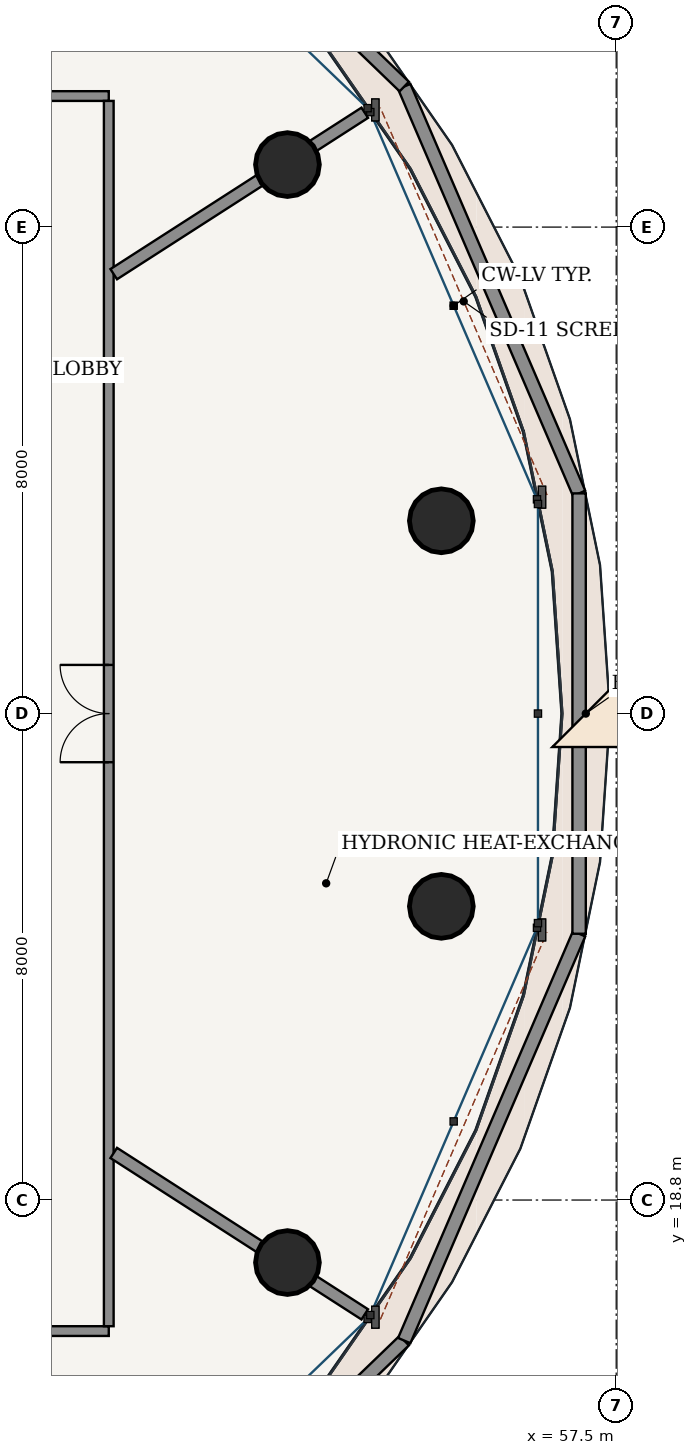
"""IFC4 building model, lengths in metres.
Left out: names, types, materials, properties, quantities, classifications, styles, units other than length and angle.
Written with IfcOpenShell. Run it as: python <this file> out.ifc"""

import sys

from ifc_helpers import new_model, si_unit, direction, frame, frame_2d, origin, origin_2d, place, context, subcontext, project, spatial, rectangle, hollow_circle, extrude, source, transform, mapped, element, fill, save


model = new_model("IFC4")
c1 = context("Model", 3, precision=1e-05, world=origin(), true_north=direction((-0.2419218956, 0.970295726276)))
c2 = subcontext(c1, "Body", "Model", "MODEL_VIEW")
j1 = project(units=[si_unit("LENGTHUNIT", "METRE"), si_unit("PLANEANGLEUNIT", "RADIAN")], contexts=[c1])
p1 = place(None, origin())
s1 = spatial("IfcSite", under=j1, at=p1, CompositionType="ELEMENT")
p2 = place(p1, origin())
s2 = spatial("IfcBuilding", under=s1, at=p2, CompositionType="ELEMENT")
p3 = place(p2, frame((0.0, 0.0, 300.7)))
s3 = spatial("IfcBuildingStorey", under=s2, at=p3, CompositionType="ELEMENT", Elevation=300.7)
for number, where, z_axis, x_axis in (
    (1, (54.624, 29.97, 0.0), (0.0, 0.0, 1.0), (1.0, 0.0, 0.0)),
    (2, (52.094, 35.828, 0.0), (0.0, 0.0, 1.0), (1.0, 0.0, 0.0)),
    (3, (52.094, 17.772, 0.0), (0.0, 0.0, 1.0), (1.0, 0.0, 0.0)),
    (4, (54.624, 23.63, 0.0), (0.0, 0.0, 1.0), (1.0, 0.0, 0.0)),
):
    element("IfcColumn", number, at=place(p3, frame(where, z_axis=z_axis, x_axis=x_axis)), inside=s3, PredefinedType="COLUMN", context=c2, shape_type="SweptSolid", body=[
        extrude(hollow_circle(Radius=0.525, WallThickness=0.035, at=origin_2d()), origin(), (0.0, 0.0, 1.0), 5.4),
    ])
p4 = place(p3, frame((56.89, 30.421, 0.0), z_axis=(0.0, 0.0, 1.0), x_axis=(-0.394894199948, 0.918726602884, 0.0)))
e5 = element("IfcWall", 5, at=p4, inside=s3, PredefinedType="PARAPET", context=c2, shape_type="SweptSolid", body=[
    extrude(rectangle(XDim=7.282, YDim=0.22, at=frame_2d((3.641, 0.0))), origin(), (0.0, 0.0, 1.0), 1.15),
])
p5 = place(p3, frame((54.014, 37.111, 0.0), z_axis=(0.0, 0.0, 1.0), x_axis=(-0.720069776959, 0.693901661845, 0.0)))
e6 = element("IfcWall", 6, at=p5, inside=s3, PredefinedType="PARAPET", context=c2, shape_type="SweptSolid", body=[
    extrude(rectangle(XDim=7.38, YDim=0.22, at=frame_2d((3.69, 0.0))), origin(), (0.0, 0.0, 1.0), 1.15),
])
p6 = place(p3, frame((48.7, 11.368, 0.0), z_axis=(0.0, 0.0, 1.0), x_axis=(0.720086306967, 0.693884508055, 0.0)))
e7 = element("IfcWall", 7, at=p6, inside=s3, PredefinedType="PARAPET", context=c2, shape_type="SweptSolid", body=[
    extrude(rectangle(XDim=7.38, YDim=0.22, at=frame_2d((3.69, 0.0))), origin(), (0.0, 0.0, 1.0), 1.15),
])
p7 = place(p3, frame((54.014, 16.489, 0.0), z_axis=(0.0, 0.0, 1.0), x_axis=(0.394882037325, 0.918731830622, 0.0)))
e8 = element("IfcWall", 8, at=p7, inside=s3, PredefinedType="PARAPET", context=c2, shape_type="SweptSolid", body=[
    extrude(rectangle(XDim=7.282, YDim=0.22, at=frame_2d((3.641, 0.0))), origin(), (0.0, 0.0, 1.0), 1.15),
])
p8 = place(p3, frame((56.89, 23.179, 0.0), z_axis=(0.0, 0.0, 1.0), x_axis=(0.0, 1.0, 0.0)))
e9 = element("IfcWall", 9, at=p8, inside=s3, PredefinedType="PARAPET", context=c2, shape_type="SweptSolid", body=[
    extrude(rectangle(XDim=7.242, YDim=0.22, at=frame_2d((3.621, 0.0))), origin(), (0.0, 0.0, 1.0), 1.15),
])
p9 = place(p3, frame((26.845, 16.645, 0.0), z_axis=(0.0, 0.0, 1.0), x_axis=(1.0, 0.0, 0.0)))
e10 = element("IfcWall", 10, at=p9, inside=s3, PredefinedType="PARTITIONING", context=c2, shape_type="SweptSolid", body=[
    extrude(rectangle(XDim=22.31, YDim=0.16, at=frame_2d((11.155, 0.0))), origin(), (0.0, 0.0, 1.0), 4.552),
])
p10 = place(p9, frame((10.355, 0.0, 0.0)))
e11 = element("IfcOpeningElement", 11, at=p10, cuts=e10, PredefinedType="OPENING", context=c2, shape_type="SweptSolid", body=[
    extrude(rectangle(XDim=1.6, YDim=2.25, at=frame_2d((0.8, 1.125))), frame((0.0, 0.09, 0.0), z_axis=(0.0, -1.0, 0.0), x_axis=(1.0, 0.0, 0.0)), (0.0, 0.0, 1.0), 0.18),
])
p11 = place(p3, frame((26.845, 36.955, 0.0), z_axis=(0.0, 0.0, 1.0), x_axis=(1.0, 0.0, 0.0)))
e12 = element("IfcWall", 12, at=p11, inside=s3, PredefinedType="PARTITIONING", context=c2, shape_type="SweptSolid", body=[
    extrude(rectangle(XDim=22.31, YDim=0.16, at=frame_2d((11.155, 0.0))), origin(), (0.0, 0.0, 1.0), 4.552),
])
p12 = place(p11, frame((10.355, 0.0, 0.0)))
e13 = element("IfcOpeningElement", 13, at=p12, cuts=e12, PredefinedType="OPENING", context=c2, shape_type="SweptSolid", body=[
    extrude(rectangle(XDim=1.6, YDim=2.25, at=frame_2d((0.8, 1.125))), frame((0.0, 0.09, 0.0), z_axis=(0.0, -1.0, 0.0), x_axis=(1.0, 0.0, 0.0)), (0.0, 0.0, 1.0), 0.18),
])
p13 = place(p3, frame((49.155, 16.725, 0.0), z_axis=(0.0, 0.0, 1.0), x_axis=(0.0, 1.0, 0.0)))
e14 = element("IfcWall", 14, at=p13, inside=s3, PredefinedType="PARTITIONING", context=c2, shape_type="SweptSolid", body=[
    extrude(rectangle(XDim=20.15, YDim=0.16, at=frame_2d((10.075, 0.0))), origin(), (0.0, 0.0, 1.0), 4.552),
])
p14 = place(p13, frame((9.275, 0.0, 0.0)))
e15 = element("IfcOpeningElement", 15, at=p14, cuts=e14, PredefinedType="OPENING", context=c2, shape_type="SweptSolid", body=[
    extrude(rectangle(XDim=1.6, YDim=2.25, at=frame_2d((0.8, 1.125))), frame((0.0, 0.09, 0.0), z_axis=(0.0, -1.0, 0.0), x_axis=(1.0, 0.0, 0.0)), (0.0, 0.0, 1.0), 0.18),
])
p15 = place(p3, frame((49.237, 19.574, 0.0), z_axis=(0.0, 0.0, 1.0), x_axis=(0.841104126714, -0.540873227314, 0.0)))
e16 = element("IfcWall", 16, at=p15, inside=s3, PredefinedType="PARTITIONING", context=c2, shape_type="SweptSolid", body=[
    extrude(rectangle(XDim=4.908, YDim=0.2, at=frame_2d((2.454, 0.0))), origin(), (0.0, 0.0, 1.0), 4.33),
])
p16 = place(p3, frame((49.237, 34.026, 0.0), z_axis=(0.0, 0.0, 1.0), x_axis=(0.841126754859, 0.540838036995, 0.0)))
e17 = element("IfcWall", 17, at=p16, inside=s3, PredefinedType="PARTITIONING", context=c2, shape_type="SweptSolid", body=[
    extrude(rectangle(XDim=4.908, YDim=0.2, at=frame_2d((2.454, 0.0))), origin(), (0.0, 0.0, 1.0), 4.33),
])
p17 = place(p3, frame((0.0, 0.0, -0.26)))
p18 = place(p17, frame((57.0, 26.8, 0.0)))
p19 = place(p18, frame((0.0, 0.0, 0.22)))
e18 = element("IfcDoor", 18, at=p19, inside=s3, OperationType="SINGLE_SWING_LEFT", PredefinedType="TRAPDOOR", context=c2, shape_type="SweptSolid", body=[
    extrude(rectangle(XDim=1.1, YDim=1.1, at=origin_2d()), origin(), (0.0, 0.0, 1.0), 0.04),
])
m1 = source(origin(), c2, "Body", "SweptSolid", [
    extrude(rectangle(XDim=1.6, YDim=2.25, at=frame_2d((0.8, 1.125))), frame((0.0, 0.025, 0.0), z_axis=(0.0, -1.0, 0.0), x_axis=(1.0, 0.0, 0.0)), (0.0, 0.0, 1.0), 0.05),
])
p20 = place(p14, origin())
e19 = element("IfcDoor", 19, at=p20, inside=s3, OperationType="DOUBLE_DOOR_SINGLE_SWING", PredefinedType="DOOR", context=c2, shape_type="MappedRepresentation", body=[
    mapped(m1, transform((0.0, 0.0, 0.0), scale=1.0)),
])
fill(e15, e19)
save(model, sys.argv[1])
